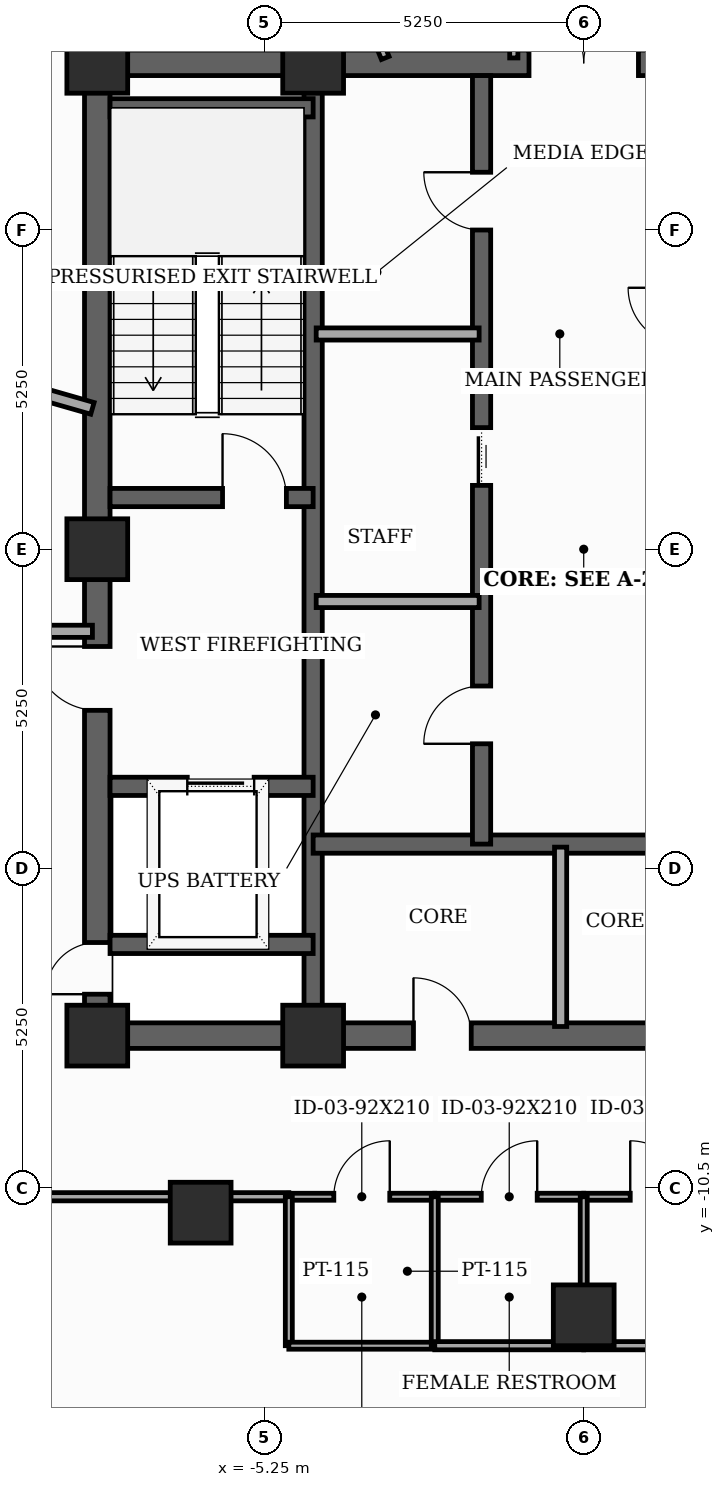
"""IFC4 building model, lengths in metres.
Left out: names, types, materials, properties, quantities, classifications, styles, units other than length and angle.
Written with IfcOpenShell. Run it as: python <this file> out.ifc"""

import sys

from ifc_helpers import new_model, si_unit, direction, frame, frame_2d, origin, origin_2d, place, context, subcontext, project, spatial, rectangle, extrude, element, fill, save


model = new_model("IFC4")
c1 = context("Model", 3, precision=1e-05, world=origin(), true_north=direction((0.0, 1.0)))
c2 = subcontext(c1, "Body", "Model", "MODEL_VIEW")
j1 = project(units=[si_unit("LENGTHUNIT", "METRE"), si_unit("PLANEANGLEUNIT", "RADIAN")], contexts=[c1])
p1 = place(None, origin())
s1 = spatial("IfcSite", under=j1, at=p1, CompositionType="ELEMENT")
p2 = place(p1, origin())
s2 = spatial("IfcBuilding", under=s1, at=p2, CompositionType="ELEMENT")
p3 = place(p2, frame((0.0, 0.0, 259.6)))
s3 = spatial("IfcBuildingStorey", under=s2, at=p3, CompositionType="ELEMENT", Elevation=259.6)
for number, where, z_axis, x_axis in (
    (1, (-8.0, -8.0, 0.0), (0.0, 0.0, 1.0), (1.0, 0.0, 0.0)),
    (2, (-4.45, -8.0, 0.0), (0.0, 0.0, 1.0), (1.0, 0.0, 0.0)),
    (3, (-4.45, 8.0, 0.0), (0.0, 0.0, 1.0), (1.0, 0.0, 0.0)),
    (4, (-8.0, 8.0, 0.0), (0.0, 0.0, 1.0), (1.0, 0.0, 0.0)),
    (5, (-8.0, 0.0, 0.0), (0.0, 0.0, 1.0), (1.0, 0.0, 0.0)),
    (6, (-6.3, -10.912, 0.0), (0.0, 0.0, 1.0), (1.0, 0.0, 0.0)),
    (7, (0.0, -12.6, 0.0), (0.0, 0.0, 1.0), (1.0, 0.0, 0.0)),
):
    element("IfcColumn", number, at=place(p3, frame(where, z_axis=z_axis, x_axis=x_axis)), inside=s3, PredefinedType="COLUMN", context=c2, shape_type="SweptSolid", body=[
        extrude(rectangle(XDim=1.0, YDim=1.0, at=origin_2d()), origin(), (0.0, 0.0, 1.0), 3.7),
    ])
p4 = place(p3, frame((-8.0, -8.0, 0.0), z_axis=(0.0, 0.0, 1.0), x_axis=(0.0, 1.0, 0.0)))
e8 = element("IfcWall", 8, at=p4, inside=s3, PredefinedType="SHEAR", context=c2, shape_type="SweptSolid", body=[
    extrude(rectangle(XDim=16.0, YDim=0.42, at=frame_2d((8.0, 0.0))), origin(), (0.0, 0.0, 1.0), 3.5),
])
p5 = place(p4, frame((0.681, 0.0, 0.0)))
e9 = element("IfcOpeningElement", 9, at=p5, cuts=e8, PredefinedType="OPENING", context=c2, shape_type="SweptSolid", body=[
    extrude(rectangle(XDim=0.85, YDim=2.02, at=frame_2d((0.425, 1.01))), frame((0.0, 0.22, 0.0), z_axis=(0.0, -1.0, 0.0), x_axis=(1.0, 0.0, 0.0)), (0.0, 0.0, 1.0), 0.44),
])
p6 = place(p4, frame((5.35, 0.0, 0.0)))
e10 = element("IfcOpeningElement", 10, at=p6, cuts=e8, PredefinedType="OPENING", context=c2, shape_type="SweptSolid", body=[
    extrude(rectangle(XDim=1.05, YDim=2.15, at=frame_2d((0.525, 1.075))), frame((0.0, 0.22, 0.0), z_axis=(0.0, -1.0, 0.0), x_axis=(1.0, 0.0, 0.0)), (0.0, 0.0, 1.0), 0.44),
])
p7 = place(p3, frame((-8.0, -8.0, 0.0), z_axis=(0.0, 0.0, 1.0), x_axis=(1.0, 0.0, 0.0)))
e11 = element("IfcWall", 11, at=p7, inside=s3, PredefinedType="SHEAR", context=c2, shape_type="SweptSolid", body=[
    extrude(rectangle(XDim=16.0, YDim=0.42, at=frame_2d((8.0, 0.0))), origin(), (0.0, 0.0, 1.0), 3.5),
])
p8 = place(p7, frame((5.2, 0.0, 0.0)))
e12 = element("IfcOpeningElement", 12, at=p8, cuts=e11, PredefinedType="OPENING", context=c2, shape_type="SweptSolid", body=[
    extrude(rectangle(XDim=0.95, YDim=2.1, at=frame_2d((0.475, 1.05))), frame((0.0, 0.22, 0.0), z_axis=(0.0, -1.0, 0.0), x_axis=(1.0, 0.0, 0.0)), (0.0, 0.0, 1.0), 0.44),
])
p9 = place(p7, frame((9.8, 0.0, 0.0)))
e13 = element("IfcOpeningElement", 13, at=p9, cuts=e11, PredefinedType="OPENING", context=c2, shape_type="SweptSolid", body=[
    extrude(rectangle(XDim=0.95, YDim=2.1, at=frame_2d((0.475, 1.05))), frame((0.0, 0.22, 0.0), z_axis=(0.0, -1.0, 0.0), x_axis=(1.0, 0.0, 0.0)), (0.0, 0.0, 1.0), 0.44),
])
p10 = place(p3, frame((-8.0, 8.0, 0.0), z_axis=(0.0, 0.0, 1.0), x_axis=(1.0, 0.0, 0.0)))
e14 = element("IfcWall", 14, at=p10, inside=s3, PredefinedType="SHEAR", context=c2, shape_type="SweptSolid", body=[
    extrude(rectangle(XDim=16.0, YDim=0.42, at=frame_2d((8.0, 0.0))), origin(), (0.0, 0.0, 1.0), 3.5),
])
p11 = place(p10, frame((7.1, 0.0, 0.0)))
e15 = element("IfcOpeningElement", 15, at=p11, cuts=e14, PredefinedType="OPENING", context=c2, shape_type="SweptSolid", body=[
    extrude(rectangle(XDim=1.8, YDim=2.15, at=frame_2d((0.9, 1.075))), frame((0.0, 0.22, 0.0), z_axis=(0.0, -1.0, 0.0), x_axis=(1.0, 0.0, 0.0)), (0.0, 0.0, 1.0), 0.44),
])
p12 = place(p3, frame((-4.45, -7.79, 0.0), z_axis=(0.0, 0.0, 1.0), x_axis=(0.0, 1.0, 0.0)))
e16 = element("IfcWall", 16, at=p12, inside=s3, PredefinedType="SHEAR", context=c2, shape_type="SweptSolid", body=[
    extrude(rectangle(XDim=15.58, YDim=0.3, at=frame_2d((7.79, 0.0))), origin(), (0.0, 0.0, 1.0), 3.5),
])
p13 = place(p3, frame((-7.79, 0.85, 0.0), z_axis=(0.0, 0.0, 1.0), x_axis=(1.0, 0.0, 0.0)))
e17 = element("IfcWall", 17, at=p13, inside=s3, PredefinedType="SHEAR", context=c2, shape_type="SweptSolid", body=[
    extrude(rectangle(XDim=3.34, YDim=0.3, at=frame_2d((1.67, 0.0))), origin(), (0.0, 0.0, 1.0), 3.5),
])
p14 = place(p13, frame((1.85, 0.0, 0.0)))
e18 = element("IfcOpeningElement", 18, at=p14, cuts=e17, PredefinedType="OPENING", context=c2, shape_type="SweptSolid", body=[
    extrude(rectangle(XDim=1.05, YDim=2.15, at=frame_2d((0.525, 1.075))), frame((0.0, 0.16, 0.0), z_axis=(0.0, -1.0, 0.0), x_axis=(1.0, 0.0, 0.0)), (0.0, 0.0, 1.0), 0.32),
])
p15 = place(p3, frame((-7.79, 7.26, 0.0), z_axis=(0.0, 0.0, 1.0), x_axis=(1.0, 0.0, 0.0)))
e19 = element("IfcWall", 19, at=p15, inside=s3, PredefinedType="SHEAR", context=c2, shape_type="SweptSolid", body=[
    extrude(rectangle(XDim=3.34, YDim=0.3, at=frame_2d((1.67, 0.0))), origin(), (0.0, 0.0, 1.0), 3.5),
])
p16 = place(p3, frame((-7.79, -3.9, 0.0), z_axis=(0.0, 0.0, 1.0), x_axis=(1.0, 0.0, 0.0)))
e20 = element("IfcWall", 20, at=p16, inside=s3, PredefinedType="SHEAR", context=c2, shape_type="SweptSolid", body=[
    extrude(rectangle(XDim=3.34, YDim=0.3, at=frame_2d((1.67, 0.0))), origin(), (0.0, 0.0, 1.0), 3.5),
])
p17 = place(p16, frame((1.27, 0.0, 0.0)))
e21 = element("IfcOpeningElement", 21, at=p17, cuts=e20, PredefinedType="OPENING", context=c2, shape_type="SweptSolid", body=[
    extrude(rectangle(XDim=1.1, YDim=2.1, at=frame_2d((0.55, 1.05))), frame((0.0, 0.16, 0.0), z_axis=(0.0, -1.0, 0.0), x_axis=(1.0, 0.0, 0.0)), (0.0, 0.0, 1.0), 0.32),
])
p18 = place(p3, frame((-7.79, -6.5, 0.0), z_axis=(0.0, 0.0, 1.0), x_axis=(1.0, 0.0, 0.0)))
e22 = element("IfcWall", 22, at=p18, inside=s3, PredefinedType="SHEAR", context=c2, shape_type="SweptSolid", body=[
    extrude(rectangle(XDim=3.34, YDim=0.3, at=frame_2d((1.67, 0.0))), origin(), (0.0, 0.0, 1.0), 3.5),
])
p19 = place(p3, frame((-4.45, -4.85, 0.0), z_axis=(0.0, 0.0, 1.0), x_axis=(1.0, 0.0, 0.0)))
e23 = element("IfcWall", 23, at=p19, inside=s3, PredefinedType="SHEAR", context=c2, shape_type="SweptSolid", body=[
    extrude(rectangle(XDim=8.9, YDim=0.3, at=frame_2d((4.45, 0.0))), origin(), (0.0, 0.0, 1.0), 3.5),
])
p20 = place(p3, frame((-1.68, -4.85, 0.0), z_axis=(0.0, 0.0, 1.0), x_axis=(0.0, 1.0, 0.0)))
e24 = element("IfcWall", 24, at=p20, inside=s3, PredefinedType="SHEAR", context=c2, shape_type="SweptSolid", body=[
    extrude(rectangle(XDim=12.64, YDim=0.3, at=frame_2d((6.32, 0.0))), origin(), (0.0, 0.0, 1.0), 3.5),
])
p21 = place(p20, frame((1.65, 0.0, 0.0)))
e25 = element("IfcOpeningElement", 25, at=p21, cuts=e24, PredefinedType="OPENING", context=c2, shape_type="SweptSolid", body=[
    extrude(rectangle(XDim=0.95, YDim=2.1, at=frame_2d((0.475, 1.05))), frame((0.0, 0.16, 0.0), z_axis=(0.0, -1.0, 0.0), x_axis=(1.0, 0.0, 0.0)), (0.0, 0.0, 1.0), 0.32),
])
p22 = place(p20, frame((5.9, 0.0, 0.0)))
e26 = element("IfcOpeningElement", 26, at=p22, cuts=e24, PredefinedType="OPENING", context=c2, shape_type="SweptSolid", body=[
    extrude(rectangle(XDim=0.95, YDim=2.1, at=frame_2d((0.475, 1.05))), frame((0.0, 0.16, 0.0), z_axis=(0.0, -1.0, 0.0), x_axis=(1.0, 0.0, 0.0)), (0.0, 0.0, 1.0), 0.32),
])
p23 = place(p20, frame((10.1, 0.0, 0.0)))
e27 = element("IfcOpeningElement", 27, at=p23, cuts=e24, PredefinedType="OPENING", context=c2, shape_type="SweptSolid", body=[
    extrude(rectangle(XDim=0.95, YDim=2.1, at=frame_2d((0.475, 1.05))), frame((0.0, 0.16, 0.0), z_axis=(0.0, -1.0, 0.0), x_axis=(1.0, 0.0, 0.0)), (0.0, 0.0, 1.0), 0.32),
])
p24 = place(p3, frame((-0.38, -7.85, 0.0), z_axis=(0.0, 0.0, 1.0), x_axis=(0.0, 1.0, 0.0)))
e28 = element("IfcWall", 28, at=p24, inside=s3, PredefinedType="SOLIDWALL", context=c2, shape_type="SweptSolid", body=[
    extrude(rectangle(XDim=2.95, YDim=0.2, at=frame_2d((1.475, 0.0))), origin(), (0.0, 0.0, 1.0), 2.885),
])
for number, where, z_axis, x_axis in (
    (29, (-4.4, -0.86, 0.0), (0.0, 0.0, 1.0), (1.0, 0.0, 0.0)),
    (30, (-4.4, 3.54, 0.0), (0.0, 0.0, 1.0), (1.0, 0.0, 0.0)),
):
    element("IfcWall", number, at=place(p3, frame(where, z_axis=z_axis, x_axis=x_axis)), inside=s3, PredefinedType="SOLIDWALL", context=c2, shape_type="SweptSolid", body=[
        extrude(rectangle(XDim=2.68, YDim=0.2, at=frame_2d((1.34, 0.0))), origin(), (0.0, 0.0, 1.0), 3.5),
    ])
p25 = place(p3, frame((-8.08, -1.35, 0.0), z_axis=(0.0, 0.0, 1.0), x_axis=(-1.0, 0.0, 0.0)))
e31 = element("IfcWall", 31, at=p25, inside=s3, PredefinedType="SOLIDWALL", context=c2, shape_type="SweptSolid", body=[
    extrude(rectangle(XDim=2.57, YDim=0.2, at=frame_2d((1.285, 0.0))), origin(), (0.0, 0.0, 1.0), 2.885),
])
p26 = place(p3, frame((-4.85, -10.65, 0.0), z_axis=(0.0, 0.0, 1.0), x_axis=(1.0, 0.0, 0.0)))
e32 = element("IfcWall", 32, at=p26, inside=s3, PredefinedType="PARTITIONING", context=c2, shape_type="SweptSolid", body=[
    extrude(rectangle(XDim=2.4, YDim=0.115, at=frame_2d((1.2, 0.0))), origin(), (0.0, 0.0, 1.0), 3.5),
])
p27 = place(p26, frame((0.74, 0.0, 0.0)))
e33 = element("IfcOpeningElement", 33, at=p27, cuts=e32, PredefinedType="OPENING", context=c2, shape_type="SweptSolid", body=[
    extrude(rectangle(XDim=0.92, YDim=2.1, at=frame_2d((0.46, 1.05))), frame((0.0, 0.067, 0.0), z_axis=(0.0, -1.0, 0.0), x_axis=(1.0, 0.0, 0.0)), (0.0, 0.0, 1.0), 0.135),
])
p28 = place(p3, frame((-10.15, -10.65, 0.0), z_axis=(0.0, 0.0, 1.0), x_axis=(1.0, 0.0, 0.0)))
e34 = element("IfcWall", 34, at=p28, inside=s3, PredefinedType="PARTITIONING", context=c2, shape_type="SweptSolid", body=[
    extrude(rectangle(XDim=5.3, YDim=0.135, at=frame_2d((2.65, 0.0))), origin(), (0.0, 0.0, 1.0), 2.885),
])
p29 = place(p3, frame((-2.45, -10.65, 0.0), z_axis=(0.0, 0.0, 1.0), x_axis=(1.0, 0.0, 0.0)))
e35 = element("IfcWall", 35, at=p29, inside=s3, PredefinedType="PARTITIONING", context=c2, shape_type="SweptSolid", body=[
    extrude(rectangle(XDim=2.45, YDim=0.115, at=frame_2d((1.225, 0.0))), origin(), (0.0, 0.0, 1.0), 2.885),
])
p30 = place(p29, frame((0.765, 0.0, 0.0)))
e36 = element("IfcOpeningElement", 36, at=p30, cuts=e35, PredefinedType="OPENING", context=c2, shape_type="SweptSolid", body=[
    extrude(rectangle(XDim=0.92, YDim=2.1, at=frame_2d((0.46, 1.05))), frame((0.0, 0.067, 0.0), z_axis=(0.0, -1.0, 0.0), x_axis=(1.0, 0.0, 0.0)), (0.0, 0.0, 1.0), 0.135),
])
p31 = place(p3, frame((0.0, -10.65, 0.0), z_axis=(0.0, 0.0, 1.0), x_axis=(1.0, 0.0, 0.0)))
e37 = element("IfcWall", 37, at=p31, inside=s3, PredefinedType="PARTITIONING", context=c2, shape_type="SweptSolid", body=[
    extrude(rectangle(XDim=2.45, YDim=0.115, at=frame_2d((1.225, 0.0))), origin(), (0.0, 0.0, 1.0), 3.5),
])
p32 = place(p31, frame((0.765, 0.0, 0.0)))
e38 = element("IfcOpeningElement", 38, at=p32, cuts=e37, PredefinedType="OPENING", context=c2, shape_type="SweptSolid", body=[
    extrude(rectangle(XDim=0.92, YDim=2.1, at=frame_2d((0.46, 1.05))), frame((0.0, 0.067, 0.0), z_axis=(0.0, -1.0, 0.0), x_axis=(1.0, 0.0, 0.0)), (0.0, 0.0, 1.0), 0.135),
])
p33 = place(p3, frame((-1.15, 10.65, 0.0), z_axis=(0.0, 0.0, 1.0), x_axis=(0.0, -1.0, 0.0)))
e39 = element("IfcWall", 39, at=p33, inside=s3, PredefinedType="PARTITIONING", context=c2, shape_type="SweptSolid", body=[
    extrude(rectangle(XDim=2.57, YDim=0.135, at=frame_2d((1.285, 0.0))), origin(), (0.0, 0.0, 1.0), 2.885),
])
p34 = place(p3, frame((-8.08, 2.317, 0.0), z_axis=(0.0, 0.0, 1.0), x_axis=(-0.961260926499, 0.275640039155, 0.0)))
e40 = element("IfcWall", 40, at=p34, inside=s3, PredefinedType="SOLIDWALL", context=c2, shape_type="SweptSolid", body=[
    extrude(rectangle(XDim=7.333, YDim=0.2, at=frame_2d((3.667, 0.0))), origin(), (0.0, 0.0, 1.0), 2.885),
])
p35 = place(p3, frame((-4.85, -10.65, 0.0), z_axis=(0.0, 0.0, 1.0), x_axis=(0.0, -1.0, 0.0)))
e41 = element("IfcWall", 41, at=p35, inside=s3, PredefinedType="PARTITIONING", context=c2, shape_type="SweptSolid", body=[
    extrude(rectangle(XDim=2.45, YDim=0.115, at=frame_2d((1.225, 0.0))), origin(), (0.0, 0.0, 1.0), 2.885),
])
p36 = place(p3, frame((-4.85, -13.1, 0.0), z_axis=(0.0, 0.0, 1.0), x_axis=(1.0, 0.0, 0.0)))
e42 = element("IfcWall", 42, at=p36, inside=s3, PredefinedType="PARTITIONING", context=c2, shape_type="SweptSolid", body=[
    extrude(rectangle(XDim=2.4, YDim=0.115, at=frame_2d((1.2, 0.0))), origin(), (0.0, 0.0, 1.0), 3.5),
])
p37 = place(p3, frame((-2.45, -13.1, 0.0), z_axis=(0.0, 0.0, 1.0), x_axis=(0.0, 1.0, 0.0)))
e43 = element("IfcWall", 43, at=p37, inside=s3, PredefinedType="PARTITIONING", context=c2, shape_type="SweptSolid", body=[
    extrude(rectangle(XDim=2.45, YDim=0.115, at=frame_2d((1.225, 0.0))), origin(), (0.0, 0.0, 1.0), 2.885),
])
for number, where, z_axis, x_axis in (
    (44, (0.0, -13.1, 0.0), (0.0, 0.0, 1.0), (-1.0, 0.0, 0.0)),
    (45, (2.45, -13.1, 0.0), (0.0, 0.0, 1.0), (-1.0, 0.0, 0.0)),
):
    element("IfcWall", number, at=place(p3, frame(where, z_axis=z_axis, x_axis=x_axis)), inside=s3, PredefinedType="PARTITIONING", context=c2, shape_type="SweptSolid", body=[
        extrude(rectangle(XDim=2.45, YDim=0.135, at=frame_2d((1.225, 0.0))), origin(), (0.0, 0.0, 1.0), 3.5),
    ])
p38 = place(p3, frame((0.0, -13.1, 0.0), z_axis=(0.0, 0.0, 1.0), x_axis=(0.0, 1.0, 0.0)))
e46 = element("IfcWall", 46, at=p38, inside=s3, PredefinedType="PARTITIONING", context=c2, shape_type="SweptSolid", body=[
    extrude(rectangle(XDim=2.45, YDim=0.115, at=frame_2d((1.225, 0.0))), origin(), (0.0, 0.0, 1.0), 2.885),
])
p39 = place(p3, frame((-5.896, 14.593, 0.0), z_axis=(0.0, 0.0, 1.0), x_axis=(0.374630268076, -0.927174289032, 0.0)))
e47 = element("IfcWall", 47, at=p39, inside=s3, PredefinedType="PARTITIONING", context=c2, shape_type="SweptSolid", body=[
    extrude(rectangle(XDim=7.024, YDim=0.135, at=frame_2d((3.512, 0.0))), origin(), (0.0, 0.0, 1.0), 2.885),
])
p40 = place(p39, frame((3.5, 0.0, 0.0)))
e48 = element("IfcOpeningElement", 48, at=p40, cuts=e47, PredefinedType="OPENING", context=c2, shape_type="SweptSolid", body=[
    extrude(rectangle(XDim=0.92, YDim=2.1, at=frame_2d((0.46, 1.05))), frame((0.0, 0.077, 0.0), z_axis=(0.0, -1.0, 0.0), x_axis=(1.0, 0.0, 0.0)), (0.0, 0.0, 1.0), 0.155),
])
p41 = place(p5, origin())
e49 = element("IfcDoor", 49, at=p41, inside=s3, OperationType="SINGLE_SWING_LEFT", PredefinedType="TRAPDOOR", context=c2, shape_type="SweptSolid", body=[
    extrude(rectangle(XDim=0.85, YDim=2.02, at=frame_2d((0.425, 1.01))), frame((0.0, 0.025, 0.0), z_axis=(0.0, -1.0, 0.0), x_axis=(1.0, 0.0, 0.0)), (0.0, 0.0, 1.0), 0.05),
])
fill(e9, e49)
p42 = place(p6, origin())
e50 = element("IfcDoor", 50, at=p42, inside=s3, OperationType="SINGLE_SWING_RIGHT", PredefinedType="DOOR", context=c2, shape_type="SweptSolid", body=[
    extrude(rectangle(XDim=1.05, YDim=2.15, at=frame_2d((0.525, 1.075))), frame((0.0, 0.025, 0.0), z_axis=(0.0, -1.0, 0.0), x_axis=(1.0, 0.0, 0.0)), (0.0, 0.0, 1.0), 0.05),
])
fill(e10, e50)
p43 = place(p8, origin())
e51 = element("IfcDoor", 51, at=p43, inside=s3, OperationType="SINGLE_SWING_LEFT", PredefinedType="DOOR", context=c2, shape_type="SweptSolid", body=[
    extrude(rectangle(XDim=0.95, YDim=2.1, at=frame_2d((0.475, 1.05))), frame((0.0, 0.025, 0.0), z_axis=(0.0, -1.0, 0.0), x_axis=(1.0, 0.0, 0.0)), (0.0, 0.0, 1.0), 0.05),
])
fill(e12, e51)
p44 = place(p11, origin())
e52 = element("IfcDoor", 52, at=p44, inside=s3, OperationType="DOUBLE_DOOR_SINGLE_SWING", PredefinedType="DOOR", context=c2, shape_type="SweptSolid", body=[
    extrude(rectangle(XDim=1.8, YDim=2.15, at=frame_2d((0.9, 1.075))), frame((0.0, 0.025, 0.0), z_axis=(0.0, -1.0, 0.0), x_axis=(1.0, 0.0, 0.0)), (0.0, 0.0, 1.0), 0.05),
])
fill(e15, e52)
p45 = place(p14, origin())
e53 = element("IfcDoor", 53, at=p45, inside=s3, OperationType="SINGLE_SWING_LEFT", PredefinedType="DOOR", context=c2, shape_type="SweptSolid", body=[
    extrude(rectangle(XDim=1.05, YDim=2.15, at=frame_2d((0.525, 1.075))), frame((0.0, 0.025, 0.0), z_axis=(0.0, -1.0, 0.0), x_axis=(1.0, 0.0, 0.0)), (0.0, 0.0, 1.0), 0.05),
])
fill(e18, e53)
p46 = place(p17, origin())
e54 = element("IfcDoor", 54, at=p46, inside=s3, OperationType="SLIDING_TO_LEFT", PredefinedType="DOOR", context=c2, shape_type="SweptSolid", body=[
    extrude(rectangle(XDim=1.1, YDim=2.1, at=frame_2d((0.55, 1.05))), frame((0.0, 0.025, 0.0), z_axis=(0.0, -1.0, 0.0), x_axis=(1.0, 0.0, 0.0)), (0.0, 0.0, 1.0), 0.05),
])
fill(e21, e54)
p47 = place(p21, origin())
e55 = element("IfcDoor", 55, at=p47, inside=s3, OperationType="SINGLE_SWING_LEFT", PredefinedType="DOOR", context=c2, shape_type="SweptSolid", body=[
    extrude(rectangle(XDim=0.95, YDim=2.1, at=frame_2d((0.475, 1.05))), frame((0.0, 0.025, 0.0), z_axis=(0.0, -1.0, 0.0), x_axis=(1.0, 0.0, 0.0)), (0.0, 0.0, 1.0), 0.05),
])
fill(e25, e55)
p48 = place(p22, origin())
e56 = element("IfcDoor", 56, at=p48, inside=s3, OperationType="SLIDING_TO_LEFT", PredefinedType="DOOR", context=c2, shape_type="SweptSolid", body=[
    extrude(rectangle(XDim=0.95, YDim=2.1, at=frame_2d((0.475, 1.05))), frame((0.0, 0.025, 0.0), z_axis=(0.0, -1.0, 0.0), x_axis=(1.0, 0.0, 0.0)), (0.0, 0.0, 1.0), 0.05),
])
fill(e26, e56)
p49 = place(p23, origin())
e57 = element("IfcDoor", 57, at=p49, inside=s3, OperationType="SINGLE_SWING_RIGHT", PredefinedType="DOOR", context=c2, shape_type="SweptSolid", body=[
    extrude(rectangle(XDim=0.95, YDim=2.1, at=frame_2d((0.475, 1.05))), frame((0.0, 0.025, 0.0), z_axis=(0.0, -1.0, 0.0), x_axis=(1.0, 0.0, 0.0)), (0.0, 0.0, 1.0), 0.05),
])
fill(e27, e57)
p50 = place(p27, origin())
e58 = element("IfcDoor", 58, at=p50, inside=s3, OperationType="SINGLE_SWING_RIGHT", PredefinedType="DOOR", context=c2, shape_type="SweptSolid", body=[
    extrude(rectangle(XDim=0.92, YDim=2.1, at=frame_2d((0.46, 1.05))), frame((0.0, 0.025, 0.0), z_axis=(0.0, -1.0, 0.0), x_axis=(1.0, 0.0, 0.0)), (0.0, 0.0, 1.0), 0.05),
])
fill(e33, e58)
p51 = place(p30, origin())
e59 = element("IfcDoor", 59, at=p51, inside=s3, OperationType="SINGLE_SWING_RIGHT", PredefinedType="DOOR", context=c2, shape_type="SweptSolid", body=[
    extrude(rectangle(XDim=0.92, YDim=2.1, at=frame_2d((0.46, 1.05))), frame((0.0, 0.025, 0.0), z_axis=(0.0, -1.0, 0.0), x_axis=(1.0, 0.0, 0.0)), (0.0, 0.0, 1.0), 0.05),
])
fill(e36, e59)
p52 = place(p32, origin())
e60 = element("IfcDoor", 60, at=p52, inside=s3, OperationType="SINGLE_SWING_LEFT", PredefinedType="DOOR", context=c2, shape_type="SweptSolid", body=[
    extrude(rectangle(XDim=0.92, YDim=2.1, at=frame_2d((0.46, 1.05))), frame((0.0, 0.025, 0.0), z_axis=(0.0, -1.0, 0.0), x_axis=(1.0, 0.0, 0.0)), (0.0, 0.0, 1.0), 0.05),
])
fill(e38, e60)
save(model, sys.argv[1])
